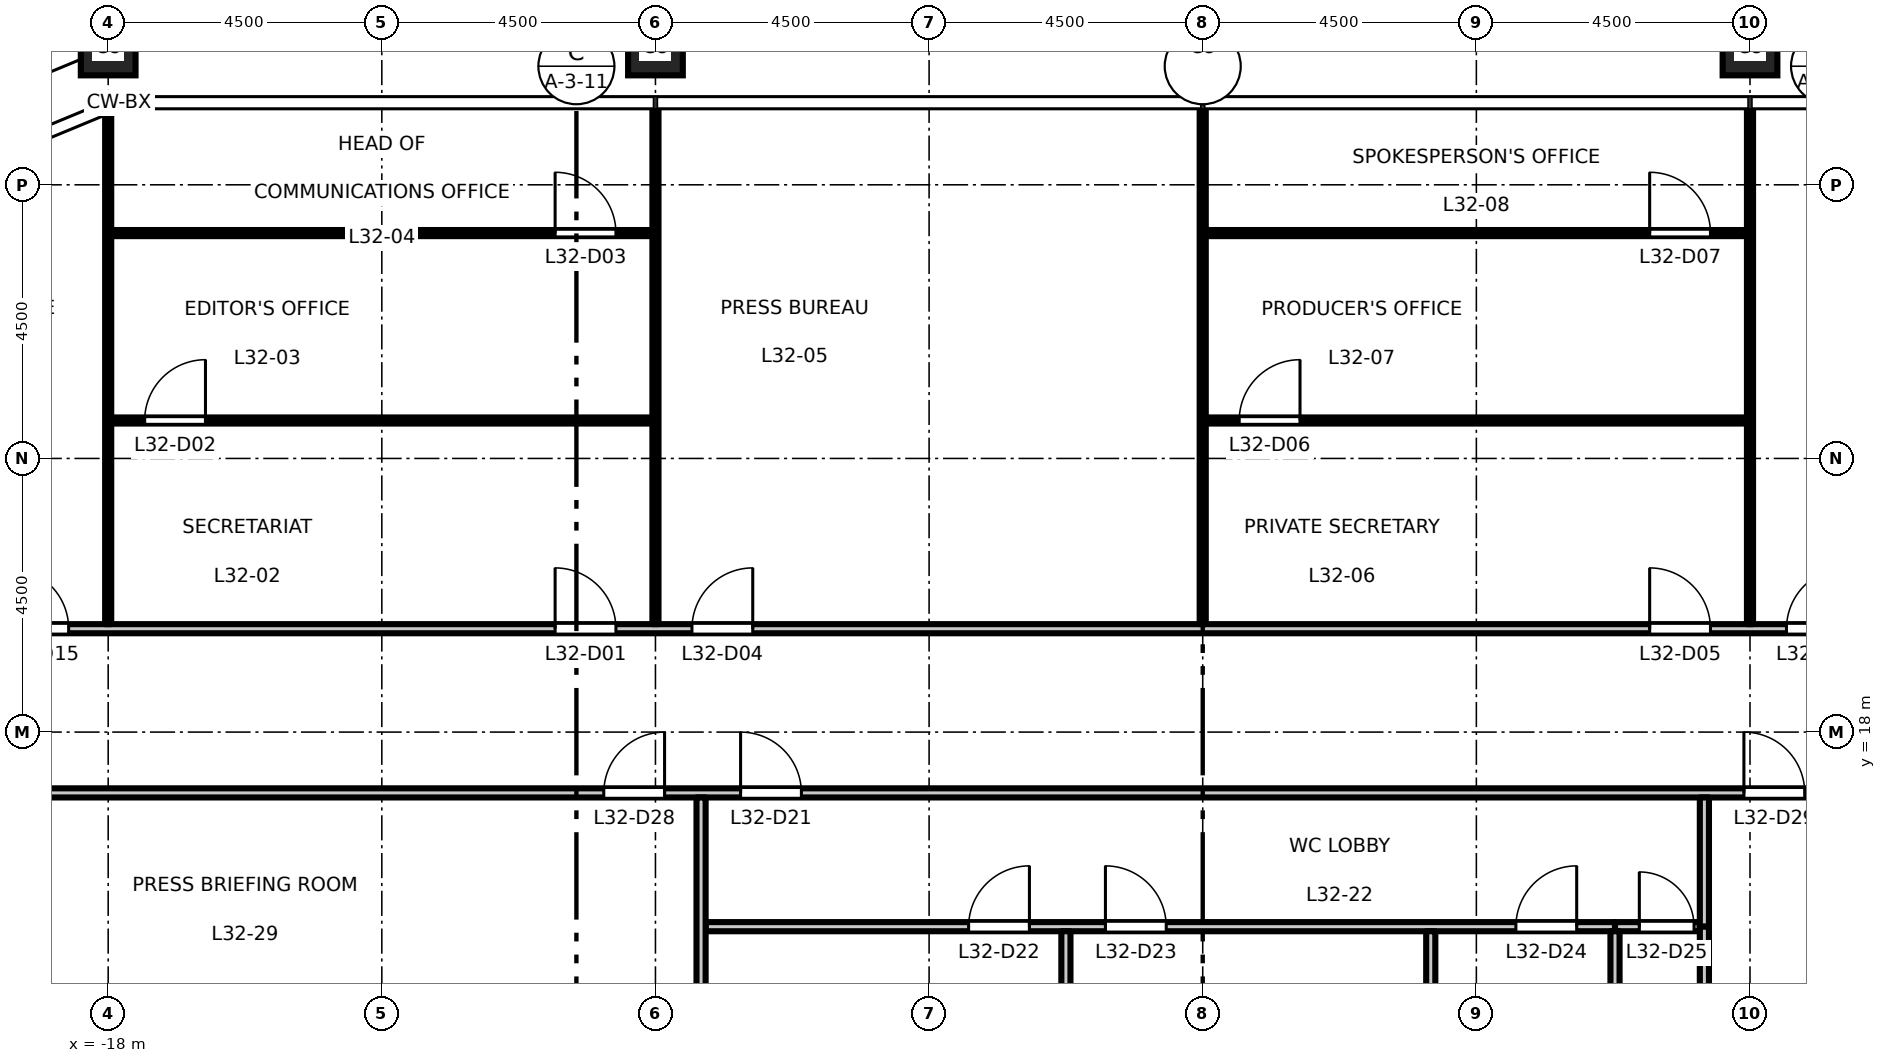
"""IFC4 building model, lengths in metres.
Left out: names, types, materials, properties, quantities, classifications, styles, units other than length and angle.
Written with IfcOpenShell. Run it as: python <this file> out.ifc"""

import sys

from ifc_helpers import new_model, si_unit, direction, frame, frame_2d, origin, origin_2d, place, context, subcontext, project, spatial, rectangle, hollow_rectangle, extrude, element, fill, save


model = new_model("IFC4")
c1 = context("Model", 3, precision=1e-05, world=origin(), true_north=direction((0.0, 1.0)))
c2 = subcontext(c1, "Body", "Model", "MODEL_VIEW")
j1 = project(units=[si_unit("LENGTHUNIT", "METRE"), si_unit("PLANEANGLEUNIT", "RADIAN")], contexts=[c1])
p1 = place(None, origin())
s1 = spatial("IfcSite", under=j1, at=p1, CompositionType="ELEMENT")
p2 = place(p1, origin())
s2 = spatial("IfcBuilding", under=s1, at=p2, CompositionType="ELEMENT")
p3 = place(p2, frame((0.0, 0.0, 149.7)))
s3 = spatial("IfcBuildingStorey", under=s2, at=p3, CompositionType="ELEMENT", Elevation=149.7)
for number, where, z_axis, x_axis in (
    (1, (9.0, 29.25, 0.0), (0.0, 0.0, 1.0), (1.0, 0.0, 0.0)),
    (2, (0.0, 29.25, 0.0), (0.0, 0.0, 1.0), (1.0, 0.0, 0.0)),
    (3, (-9.0, 29.25, 0.0), (0.0, 0.0, 1.0), (1.0, 0.0, 0.0)),
    (4, (-18.0, 29.25, 0.0), (0.0, 0.0, 1.0), (1.0, 0.0, 0.0)),
):
    element("IfcColumn", number, at=place(p3, frame(where, z_axis=z_axis, x_axis=x_axis)), inside=s3, PredefinedType="COLUMN", context=c2, shape_type="SweptSolid", body=[
        extrude(hollow_rectangle(XDim=0.9, YDim=0.9, WallThickness=0.05, at=origin_2d()), origin(), (0.0, 0.0, 1.0), 4.5),
    ])
p4 = place(p3, frame((-8.175, 14.8, 0.0), z_axis=(0.0, 0.0, 1.0), x_axis=(1.0, 0.0, 0.0)))
e5 = element("IfcWall", 5, at=p4, inside=s3, PredefinedType="PARTITIONING", context=c2, shape_type="SweptSolid", body=[
    extrude(rectangle(XDim=14.955, YDim=0.15, at=frame_2d((7.478, 0.0))), origin(), (0.0, 0.0, 1.0), 4.35),
])
p5 = place(p4, frame((4.325, 0.0, 0.0)))
e6 = element("IfcOpeningElement", 6, at=p5, cuts=e5, PredefinedType="OPENING", context=c2, shape_type="SweptSolid", body=[
    extrude(rectangle(XDim=1.0, YDim=2.1, at=frame_2d((0.5, 1.05))), frame((0.0, 0.085, 0.0), z_axis=(0.0, -1.0, 0.0), x_axis=(1.0, 0.0, 0.0)), (0.0, 0.0, 1.0), 0.17),
])
p6 = place(p4, frame((6.575, 0.0, 0.0)))
e7 = element("IfcOpeningElement", 7, at=p6, cuts=e5, PredefinedType="OPENING", context=c2, shape_type="SweptSolid", body=[
    extrude(rectangle(XDim=1.0, YDim=2.1, at=frame_2d((0.5, 1.05))), frame((0.0, 0.085, 0.0), z_axis=(0.0, -1.0, 0.0), x_axis=(1.0, 0.0, 0.0)), (0.0, 0.0, 1.0), 0.17),
])
p7 = place(p4, frame((13.325, 0.0, 0.0)))
e8 = element("IfcOpeningElement", 8, at=p7, cuts=e5, PredefinedType="OPENING", context=c2, shape_type="SweptSolid", body=[
    extrude(rectangle(XDim=1.0, YDim=2.1, at=frame_2d((0.5, 1.05))), frame((0.0, 0.085, 0.0), z_axis=(0.0, -1.0, 0.0), x_axis=(1.0, 0.0, 0.0)), (0.0, 0.0, 1.0), 0.17),
])
p8 = place(p3, frame((6.78, 14.8, 0.0), z_axis=(0.0, 0.0, 1.0), x_axis=(1.0, 0.0, 0.0)))
e9 = element("IfcWall", 9, at=p8, inside=s3, PredefinedType="PARTITIONING", context=c2, shape_type="SweptSolid", body=[
    extrude(rectangle(XDim=1.395, YDim=0.15, at=frame_2d((0.698, 0.0))), origin(), (0.0, 0.0, 1.0), 4.35),
])
p9 = place(p8, frame((0.4, 0.0, 0.0)))
e10 = element("IfcOpeningElement", 10, at=p9, cuts=e9, PredefinedType="OPENING", context=c2, shape_type="SweptSolid", body=[
    extrude(rectangle(XDim=0.9, YDim=2.1, at=frame_2d((0.45, 1.05))), frame((0.0, 0.085, 0.0), z_axis=(0.0, -1.0, 0.0), x_axis=(1.0, 0.0, 0.0)), (0.0, 0.0, 1.0), 0.17),
])
p10 = place(p3, frame((-21.825, 17.0, 0.0), z_axis=(0.0, 0.0, 1.0), x_axis=(1.0, 0.0, 0.0)))
e11 = element("IfcWall", 11, at=p10, inside=s3, PredefinedType="PARTITIONING", context=c2, shape_type="SweptSolid", body=[
    extrude(rectangle(XDim=43.65, YDim=0.15, at=frame_2d((21.825, 0.0))), origin(), (0.0, 0.0, 1.0), 4.35),
])
p11 = place(p10, frame((14.225, 0.0, 0.0)))
e12 = element("IfcOpeningElement", 12, at=p11, cuts=e11, PredefinedType="OPENING", context=c2, shape_type="SweptSolid", body=[
    extrude(rectangle(XDim=1.0, YDim=2.1, at=frame_2d((0.5, 1.05))), frame((0.0, 0.085, 0.0), z_axis=(0.0, -1.0, 0.0), x_axis=(1.0, 0.0, 0.0)), (0.0, 0.0, 1.0), 0.17),
])
p12 = place(p10, frame((11.975, 0.0, 0.0)))
e13 = element("IfcOpeningElement", 13, at=p12, cuts=e11, PredefinedType="OPENING", context=c2, shape_type="SweptSolid", body=[
    extrude(rectangle(XDim=1.0, YDim=2.1, at=frame_2d((0.5, 1.05))), frame((0.0, 0.085, 0.0), z_axis=(0.0, -1.0, 0.0), x_axis=(1.0, 0.0, 0.0)), (0.0, 0.0, 1.0), 0.17),
])
p13 = place(p10, frame((30.725, 0.0, 0.0)))
e14 = element("IfcOpeningElement", 14, at=p13, cuts=e11, PredefinedType="OPENING", context=c2, shape_type="SweptSolid", body=[
    extrude(rectangle(XDim=1.0, YDim=2.1, at=frame_2d((0.5, 1.05))), frame((0.0, 0.085, 0.0), z_axis=(0.0, -1.0, 0.0), x_axis=(1.0, 0.0, 0.0)), (0.0, 0.0, 1.0), 0.17),
])
p14 = place(p3, frame((-27.474, 19.7, 0.0), z_axis=(0.0, 0.0, 1.0), x_axis=(1.0, 0.0, 0.0)))
e15 = element("IfcWall", 15, at=p14, inside=s3, PredefinedType="PARTITIONING", context=c2, shape_type="SweptSolid", body=[
    extrude(rectangle(XDim=54.948, YDim=0.15, at=frame_2d((27.474, 0.0))), origin(), (0.0, 0.0, 1.0), 4.35),
])
p15 = place(p14, frame((16.824, 0.0, 0.0)))
e16 = element("IfcOpeningElement", 16, at=p15, cuts=e15, PredefinedType="OPENING", context=c2, shape_type="SweptSolid", body=[
    extrude(rectangle(XDim=1.0, YDim=2.1, at=frame_2d((0.5, 1.05))), frame((0.0, 0.085, 0.0), z_axis=(0.0, -1.0, 0.0), x_axis=(1.0, 0.0, 0.0)), (0.0, 0.0, 1.0), 0.17),
])
p16 = place(p14, frame((19.074, 0.0, 0.0)))
e17 = element("IfcOpeningElement", 17, at=p16, cuts=e15, PredefinedType="OPENING", context=c2, shape_type="SweptSolid", body=[
    extrude(rectangle(XDim=1.0, YDim=2.1, at=frame_2d((0.5, 1.05))), frame((0.0, 0.085, 0.0), z_axis=(0.0, -1.0, 0.0), x_axis=(1.0, 0.0, 0.0)), (0.0, 0.0, 1.0), 0.17),
])
p17 = place(p14, frame((34.824, 0.0, 0.0)))
e18 = element("IfcOpeningElement", 18, at=p17, cuts=e15, PredefinedType="OPENING", context=c2, shape_type="SweptSolid", body=[
    extrude(rectangle(XDim=1.0, YDim=2.1, at=frame_2d((0.5, 1.05))), frame((0.0, 0.085, 0.0), z_axis=(0.0, -1.0, 0.0), x_axis=(1.0, 0.0, 0.0)), (0.0, 0.0, 1.0), 0.17),
])
p18 = place(p14, frame((37.074, 0.0, 0.0)))
e19 = element("IfcOpeningElement", 19, at=p18, cuts=e15, PredefinedType="OPENING", context=c2, shape_type="SweptSolid", body=[
    extrude(rectangle(XDim=1.0, YDim=2.1, at=frame_2d((0.5, 1.05))), frame((0.0, 0.085, 0.0), z_axis=(0.0, -1.0, 0.0), x_axis=(1.0, 0.0, 0.0)), (0.0, 0.0, 1.0), 0.17),
])
p19 = place(p14, frame((7.824, 0.0, 0.0)))
e20 = element("IfcOpeningElement", 20, at=p19, cuts=e15, PredefinedType="OPENING", context=c2, shape_type="SweptSolid", body=[
    extrude(rectangle(XDim=1.0, YDim=2.1, at=frame_2d((0.5, 1.05))), frame((0.0, 0.085, 0.0), z_axis=(0.0, -1.0, 0.0), x_axis=(1.0, 0.0, 0.0)), (0.0, 0.0, 1.0), 0.17),
])
p20 = place(p14, frame((46.048, 0.0, 0.0)))
e21 = element("IfcOpeningElement", 21, at=p20, cuts=e15, PredefinedType="OPENING", context=c2, shape_type="SweptSolid", body=[
    extrude(rectangle(XDim=1.0, YDim=2.1, at=frame_2d((0.5, 1.05))), frame((0.0, 0.085, 0.0), z_axis=(0.0, -1.0, 0.0), x_axis=(1.0, 0.0, 0.0)), (0.0, 0.0, 1.0), 0.17),
])
p21 = place(p3, frame((-17.95, 23.124, 0.0), z_axis=(0.0, 0.0, 1.0), x_axis=(1.0, 0.0, 0.0)))
e22 = element("IfcWall", 22, at=p21, inside=s3, PredefinedType="PARTITIONING", context=c2, shape_type="SweptSolid", body=[
    extrude(rectangle(XDim=8.9, YDim=0.1, at=frame_2d((4.45, 0.0))), origin(), (0.0, 0.0, 1.0), 4.35),
])
p22 = place(p21, frame((0.55, 0.0, 0.0)))
e23 = element("IfcOpeningElement", 23, at=p22, cuts=e22, PredefinedType="OPENING", context=c2, shape_type="SweptSolid", body=[
    extrude(rectangle(XDim=1.0, YDim=2.1, at=frame_2d((0.5, 1.05))), frame((0.0, 0.06, 0.0), z_axis=(0.0, -1.0, 0.0), x_axis=(1.0, 0.0, 0.0)), (0.0, 0.0, 1.0), 0.12),
])
p23 = place(p3, frame((0.05, 23.124, 0.0), z_axis=(0.0, 0.0, 1.0), x_axis=(1.0, 0.0, 0.0)))
e24 = element("IfcWall", 24, at=p23, inside=s3, PredefinedType="PARTITIONING", context=c2, shape_type="SweptSolid", body=[
    extrude(rectangle(XDim=8.9, YDim=0.1, at=frame_2d((4.45, 0.0))), origin(), (0.0, 0.0, 1.0), 4.35),
])
p24 = place(p23, frame((0.55, 0.0, 0.0)))
e25 = element("IfcOpeningElement", 25, at=p24, cuts=e24, PredefinedType="OPENING", context=c2, shape_type="SweptSolid", body=[
    extrude(rectangle(XDim=1.0, YDim=2.1, at=frame_2d((0.5, 1.05))), frame((0.0, 0.06, 0.0), z_axis=(0.0, -1.0, 0.0), x_axis=(1.0, 0.0, 0.0)), (0.0, 0.0, 1.0), 0.12),
])
p25 = place(p3, frame((-17.95, 26.206, 0.0), z_axis=(0.0, 0.0, 1.0), x_axis=(1.0, 0.0, 0.0)))
e26 = element("IfcWall", 26, at=p25, inside=s3, PredefinedType="PARTITIONING", context=c2, shape_type="SweptSolid", body=[
    extrude(rectangle(XDim=8.9, YDim=0.1, at=frame_2d((4.45, 0.0))), origin(), (0.0, 0.0, 1.0), 4.35),
])
p26 = place(p25, frame((7.3, 0.0, 0.0)))
e27 = element("IfcOpeningElement", 27, at=p26, cuts=e26, PredefinedType="OPENING", context=c2, shape_type="SweptSolid", body=[
    extrude(rectangle(XDim=1.0, YDim=2.1, at=frame_2d((0.5, 1.05))), frame((0.0, 0.06, 0.0), z_axis=(0.0, -1.0, 0.0), x_axis=(1.0, 0.0, 0.0)), (0.0, 0.0, 1.0), 0.12),
])
p27 = place(p3, frame((0.05, 26.206, 0.0), z_axis=(0.0, 0.0, 1.0), x_axis=(1.0, 0.0, 0.0)))
e28 = element("IfcWall", 28, at=p27, inside=s3, PredefinedType="PARTITIONING", context=c2, shape_type="SweptSolid", body=[
    extrude(rectangle(XDim=8.9, YDim=0.1, at=frame_2d((4.45, 0.0))), origin(), (0.0, 0.0, 1.0), 4.35),
])
p28 = place(p27, frame((7.3, 0.0, 0.0)))
e29 = element("IfcOpeningElement", 29, at=p28, cuts=e28, PredefinedType="OPENING", context=c2, shape_type="SweptSolid", body=[
    extrude(rectangle(XDim=1.0, YDim=2.1, at=frame_2d((0.5, 1.05))), frame((0.0, 0.06, 0.0), z_axis=(0.0, -1.0, 0.0), x_axis=(1.0, 0.0, 0.0)), (0.0, 0.0, 1.0), 0.12),
])
p29 = place(p3, frame((-18.0, 19.775, 0.0), z_axis=(0.0, 0.0, 1.0), x_axis=(0.0, 1.0, 0.0)))
e30 = element("IfcWall", 30, at=p29, inside=s3, PredefinedType="PARTITIONING", context=c2, shape_type="SweptSolid", body=[
    extrude(rectangle(XDim=8.403, YDim=0.1, at=frame_2d((4.202, 0.0))), origin(), (0.0, 0.0, 1.0), 3.45),
])
p30 = place(p3, frame((-9.0, 19.775, 0.0), z_axis=(0.0, 0.0, 1.0), x_axis=(0.0, 1.0, 0.0)))
e31 = element("IfcWall", 31, at=p30, inside=s3, PredefinedType="PARTITIONING", context=c2, shape_type="SweptSolid", body=[
    extrude(rectangle(XDim=8.485, YDim=0.1, at=frame_2d((4.243, 0.0))), origin(), (0.0, 0.0, 1.0), 3.45),
])
p31 = place(p3, frame((-8.25, 13.5, 0.0), z_axis=(0.0, 0.0, 1.0), x_axis=(0.0, 1.0, 0.0)))
e32 = element("IfcWall", 32, at=p31, inside=s3, PredefinedType="PARTITIONING", context=c2, shape_type="SweptSolid", body=[
    extrude(rectangle(XDim=3.425, YDim=0.15, at=frame_2d((1.712, 0.0))), origin(), (0.0, 0.0, 1.0), 4.35),
])
p32 = place(p3, frame((-2.25, 8.37, 0.0), z_axis=(0.0, 0.0, 1.0), x_axis=(0.0, 1.0, 0.0)))
e33 = element("IfcWall", 33, at=p32, inside=s3, PredefinedType="PARTITIONING", context=c2, shape_type="SweptSolid", body=[
    extrude(rectangle(XDim=6.355, YDim=0.15, at=frame_2d((3.177, 0.0))), origin(), (0.0, 0.0, 1.0), 4.35),
])
p33 = place(p3, frame((0.0, 19.775, 0.0), z_axis=(0.0, 0.0, 1.0), x_axis=(0.0, 1.0, 0.0)))
e34 = element("IfcWall", 34, at=p33, inside=s3, PredefinedType="PARTITIONING", context=c2, shape_type="SweptSolid", body=[
    extrude(rectangle(XDim=8.485, YDim=0.1, at=frame_2d((4.243, 0.0))), origin(), (0.0, 0.0, 1.0), 3.45),
])
p34 = place(p3, frame((3.75, 8.37, 0.0), z_axis=(0.0, 0.0, 1.0), x_axis=(0.0, 1.0, 0.0)))
e35 = element("IfcWall", 35, at=p34, inside=s3, PredefinedType="PARTITIONING", context=c2, shape_type="SweptSolid", body=[
    extrude(rectangle(XDim=6.355, YDim=0.15, at=frame_2d((3.177, 0.0))), origin(), (0.0, 0.0, 1.0), 4.35),
])
p35 = place(p3, frame((6.78, 8.087, 0.0), z_axis=(0.0, 0.0, 1.0), x_axis=(0.0, 1.0, 0.0)))
e36 = element("IfcWall", 36, at=p35, inside=s3, PredefinedType="PARTITIONING", context=c2, shape_type="SweptSolid", body=[
    extrude(rectangle(XDim=6.638, YDim=0.15, at=frame_2d((3.319, 0.0))), origin(), (0.0, 0.0, 1.0), 4.35),
])
p36 = place(p3, frame((8.25, 14.8, 0.0), z_axis=(0.0, 0.0, 1.0), x_axis=(0.0, 1.0, 0.0)))
e37 = element("IfcWall", 37, at=p36, inside=s3, PredefinedType="PARTITIONING", context=c2, shape_type="SweptSolid", body=[
    extrude(rectangle(XDim=2.125, YDim=0.15, at=frame_2d((1.062, 0.0))), origin(), (0.0, 0.0, 1.0), 4.35),
])
p37 = place(p3, frame((8.25, 13.5, 0.0), z_axis=(0.0, 0.0, 1.0), x_axis=(0.0, 1.0, 0.0)))
e38 = element("IfcWall", 38, at=p37, inside=s3, PredefinedType="PARTITIONING", context=c2, shape_type="SweptSolid", body=[
    extrude(rectangle(XDim=1.3, YDim=0.15, at=frame_2d((0.65, 0.0))), origin(), (0.0, 0.0, 1.0), 4.35),
])
p38 = place(p3, frame((9.0, 19.775, 0.0), z_axis=(0.0, 0.0, 1.0), x_axis=(0.0, 1.0, 0.0)))
e39 = element("IfcWall", 39, at=p38, inside=s3, PredefinedType="PARTITIONING", context=c2, shape_type="SweptSolid", body=[
    extrude(rectangle(XDim=8.485, YDim=0.1, at=frame_2d((4.243, 0.0))), origin(), (0.0, 0.0, 1.0), 3.45),
])
p39 = place(p15, origin())
e40 = element("IfcDoor", 40, at=p39, inside=s3, OperationType="SINGLE_SWING_LEFT", PredefinedType="DOOR", context=c2, shape_type="SweptSolid", body=[
    extrude(rectangle(XDim=1.0, YDim=2.1, at=frame_2d((0.5, 1.05))), frame((0.0, 0.025, 0.0), z_axis=(0.0, -1.0, 0.0), x_axis=(1.0, 0.0, 0.0)), (0.0, 0.0, 1.0), 0.05),
])
fill(e16, e40)
p40 = place(p22, origin())
e41 = element("IfcDoor", 41, at=p40, inside=s3, OperationType="SINGLE_SWING_RIGHT", PredefinedType="DOOR", context=c2, shape_type="SweptSolid", body=[
    extrude(rectangle(XDim=1.0, YDim=2.1, at=frame_2d((0.5, 1.05))), frame((0.0, 0.025, 0.0), z_axis=(0.0, -1.0, 0.0), x_axis=(1.0, 0.0, 0.0)), (0.0, 0.0, 1.0), 0.05),
])
fill(e23, e41)
p41 = place(p26, origin())
e42 = element("IfcDoor", 42, at=p41, inside=s3, OperationType="SINGLE_SWING_LEFT", PredefinedType="DOOR", context=c2, shape_type="SweptSolid", body=[
    extrude(rectangle(XDim=1.0, YDim=2.1, at=frame_2d((0.5, 1.05))), frame((0.0, 0.025, 0.0), z_axis=(0.0, -1.0, 0.0), x_axis=(1.0, 0.0, 0.0)), (0.0, 0.0, 1.0), 0.05),
])
fill(e27, e42)
p42 = place(p16, origin())
e43 = element("IfcDoor", 43, at=p42, inside=s3, OperationType="SINGLE_SWING_RIGHT", PredefinedType="DOOR", context=c2, shape_type="SweptSolid", body=[
    extrude(rectangle(XDim=1.0, YDim=2.1, at=frame_2d((0.5, 1.05))), frame((0.0, 0.025, 0.0), z_axis=(0.0, -1.0, 0.0), x_axis=(1.0, 0.0, 0.0)), (0.0, 0.0, 1.0), 0.05),
])
fill(e17, e43)
p43 = place(p17, origin())
e44 = element("IfcDoor", 44, at=p43, inside=s3, OperationType="SINGLE_SWING_LEFT", PredefinedType="DOOR", context=c2, shape_type="SweptSolid", body=[
    extrude(rectangle(XDim=1.0, YDim=2.1, at=frame_2d((0.5, 1.05))), frame((0.0, 0.025, 0.0), z_axis=(0.0, -1.0, 0.0), x_axis=(1.0, 0.0, 0.0)), (0.0, 0.0, 1.0), 0.05),
])
fill(e18, e44)
p44 = place(p24, origin())
e45 = element("IfcDoor", 45, at=p44, inside=s3, OperationType="SINGLE_SWING_RIGHT", PredefinedType="DOOR", context=c2, shape_type="SweptSolid", body=[
    extrude(rectangle(XDim=1.0, YDim=2.1, at=frame_2d((0.5, 1.05))), frame((0.0, 0.025, 0.0), z_axis=(0.0, -1.0, 0.0), x_axis=(1.0, 0.0, 0.0)), (0.0, 0.0, 1.0), 0.05),
])
fill(e25, e45)
p45 = place(p28, origin())
e46 = element("IfcDoor", 46, at=p45, inside=s3, OperationType="SINGLE_SWING_LEFT", PredefinedType="DOOR", context=c2, shape_type="SweptSolid", body=[
    extrude(rectangle(XDim=1.0, YDim=2.1, at=frame_2d((0.5, 1.05))), frame((0.0, 0.025, 0.0), z_axis=(0.0, -1.0, 0.0), x_axis=(1.0, 0.0, 0.0)), (0.0, 0.0, 1.0), 0.05),
])
fill(e29, e46)
p46 = place(p18, origin())
e47 = element("IfcDoor", 47, at=p46, inside=s3, OperationType="SINGLE_SWING_RIGHT", PredefinedType="DOOR", context=c2, shape_type="SweptSolid", body=[
    extrude(rectangle(XDim=1.0, YDim=2.1, at=frame_2d((0.5, 1.05))), frame((0.0, 0.025, 0.0), z_axis=(0.0, -1.0, 0.0), x_axis=(1.0, 0.0, 0.0)), (0.0, 0.0, 1.0), 0.05),
])
fill(e19, e47)
p47 = place(p19, origin())
e48 = element("IfcDoor", 48, at=p47, inside=s3, OperationType="SINGLE_SWING_LEFT", PredefinedType="DOOR", context=c2, shape_type="SweptSolid", body=[
    extrude(rectangle(XDim=1.0, YDim=2.1, at=frame_2d((0.5, 1.05))), frame((0.0, 0.025, 0.0), z_axis=(0.0, -1.0, 0.0), x_axis=(1.0, 0.0, 0.0)), (0.0, 0.0, 1.0), 0.05),
])
fill(e20, e48)
p48 = place(p11, origin())
e49 = element("IfcDoor", 49, at=p48, inside=s3, OperationType="SINGLE_SWING_LEFT", PredefinedType="DOOR", context=c2, shape_type="SweptSolid", body=[
    extrude(rectangle(XDim=1.0, YDim=2.1, at=frame_2d((0.5, 1.05))), frame((0.0, 0.025, 0.0), z_axis=(0.0, -1.0, 0.0), x_axis=(1.0, 0.0, 0.0)), (0.0, 0.0, 1.0), 0.05),
])
fill(e12, e49)
p49 = place(p5, origin())
e50 = element("IfcDoor", 50, at=p49, inside=s3, OperationType="SINGLE_SWING_RIGHT", PredefinedType="DOOR", context=c2, shape_type="SweptSolid", body=[
    extrude(rectangle(XDim=1.0, YDim=2.1, at=frame_2d((0.5, 1.05))), frame((0.0, 0.025, 0.0), z_axis=(0.0, -1.0, 0.0), x_axis=(1.0, 0.0, 0.0)), (0.0, 0.0, 1.0), 0.05),
])
fill(e6, e50)
p50 = place(p6, origin())
e51 = element("IfcDoor", 51, at=p50, inside=s3, OperationType="SINGLE_SWING_LEFT", PredefinedType="DOOR", context=c2, shape_type="SweptSolid", body=[
    extrude(rectangle(XDim=1.0, YDim=2.1, at=frame_2d((0.5, 1.05))), frame((0.0, 0.025, 0.0), z_axis=(0.0, -1.0, 0.0), x_axis=(1.0, 0.0, 0.0)), (0.0, 0.0, 1.0), 0.05),
])
fill(e7, e51)
p51 = place(p7, origin())
e52 = element("IfcDoor", 52, at=p51, inside=s3, OperationType="SINGLE_SWING_RIGHT", PredefinedType="DOOR", context=c2, shape_type="SweptSolid", body=[
    extrude(rectangle(XDim=1.0, YDim=2.1, at=frame_2d((0.5, 1.05))), frame((0.0, 0.025, 0.0), z_axis=(0.0, -1.0, 0.0), x_axis=(1.0, 0.0, 0.0)), (0.0, 0.0, 1.0), 0.05),
])
fill(e8, e52)
p52 = place(p9, origin())
e53 = element("IfcDoor", 53, at=p52, inside=s3, OperationType="SINGLE_SWING_LEFT", PredefinedType="DOOR", context=c2, shape_type="SweptSolid", body=[
    extrude(rectangle(XDim=0.9, YDim=2.1, at=frame_2d((0.45, 1.05))), frame((0.0, 0.025, 0.0), z_axis=(0.0, -1.0, 0.0), x_axis=(1.0, 0.0, 0.0)), (0.0, 0.0, 1.0), 0.05),
])
fill(e10, e53)
p53 = place(p12, origin())
e54 = element("IfcDoor", 54, at=p53, inside=s3, OperationType="SINGLE_SWING_RIGHT", PredefinedType="DOOR", context=c2, shape_type="SweptSolid", body=[
    extrude(rectangle(XDim=1.0, YDim=2.1, at=frame_2d((0.5, 1.05))), frame((0.0, 0.025, 0.0), z_axis=(0.0, -1.0, 0.0), x_axis=(1.0, 0.0, 0.0)), (0.0, 0.0, 1.0), 0.05),
])
fill(e13, e54)
p54 = place(p13, origin())
e55 = element("IfcDoor", 55, at=p54, inside=s3, OperationType="SINGLE_SWING_LEFT", PredefinedType="DOOR", context=c2, shape_type="SweptSolid", body=[
    extrude(rectangle(XDim=1.0, YDim=2.1, at=frame_2d((0.5, 1.05))), frame((0.0, 0.025, 0.0), z_axis=(0.0, -1.0, 0.0), x_axis=(1.0, 0.0, 0.0)), (0.0, 0.0, 1.0), 0.05),
])
fill(e14, e55)
save(model, sys.argv[1])
